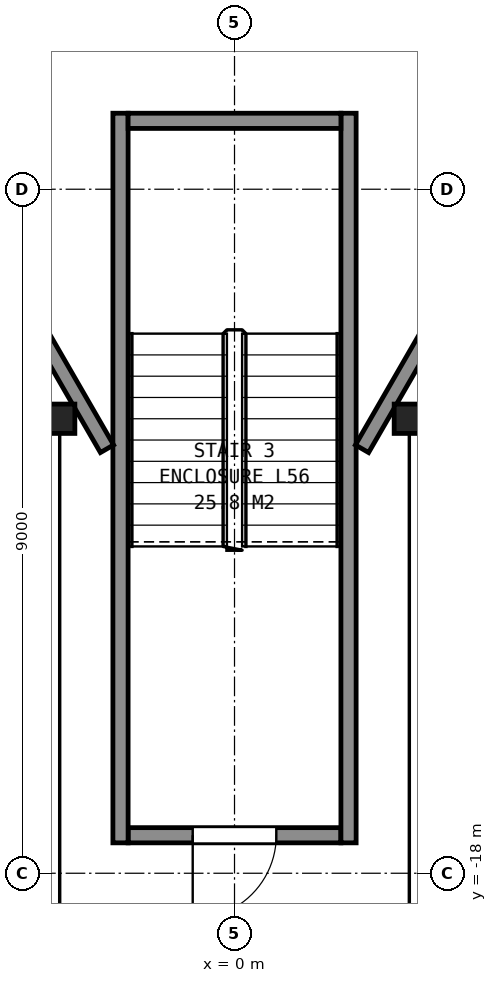
"""IFC4 building model, lengths in metres.
Left out: names, types, materials, properties, quantities, classifications, styles, units other than length and angle.
Written with IfcOpenShell. Run it as: python <this file> out.ifc"""

import sys

from ifc_helpers import new_model, si_unit, direction, frame, frame_2d, origin, origin_2d, place, context, subcontext, project, spatial, rectangle, i_section, extrude, element, fill, save


model = new_model("IFC4")
c1 = context("Model", 3, precision=1e-05, world=origin(), true_north=direction((0.0, 1.0)))
c2 = subcontext(c1, "Body", "Model", "MODEL_VIEW")
j1 = project(units=[si_unit("LENGTHUNIT", "METRE"), si_unit("PLANEANGLEUNIT", "RADIAN")], contexts=[c1])
p1 = place(None, origin())
s1 = spatial("IfcSite", under=j1, at=p1, CompositionType="ELEMENT")
p2 = place(p1, origin())
s2 = spatial("IfcBuilding", under=s1, at=p2, CompositionType="ELEMENT")
p3 = place(p2, frame((0.0, 0.0, 224.9)))
s3 = spatial("IfcBuildingStorey", under=s2, at=p3, CompositionType="ELEMENT", Elevation=224.9)
for number, where, z_axis, x_axis in (
    (1, (-2.3, -12.02, 0.0), (0.0, 0.0, 1.0), (1.0, 0.0, 0.0)),
    (2, (2.3, -12.02, 0.0), (0.0, 0.0, 1.0), (1.0, 0.0, 0.0)),
):
    element("IfcColumn", number, at=place(p3, frame(where, z_axis=z_axis, x_axis=x_axis)), inside=s3, PredefinedType="COLUMN", context=c2, shape_type="SweptSolid", body=[
        extrude(i_section(OverallWidth=0.399, OverallDepth=0.386, WebThickness=0.021, FlangeThickness=0.033, FilletRadius=0.015, at=origin_2d()), origin(), (0.0, 0.0, 1.0), 3.7),
    ])
p4 = place(p3, frame((-1.4, -17.5, 0.0), z_axis=(0.0, 0.0, 1.0), x_axis=(1.0, 0.0, 0.0)))
e3 = element("IfcWall", 3, at=p4, inside=s3, PredefinedType="PARTITIONING", context=c2, shape_type="SweptSolid", body=[
    extrude(rectangle(XDim=2.8, YDim=0.2, at=frame_2d((1.4, 0.0))), origin(), (0.0, 0.0, 1.0), 3.45),
])
p5 = place(p4, frame((0.85, 0.0, 0.0)))
e4 = element("IfcOpeningElement", 4, at=p5, cuts=e3, PredefinedType="OPENING", context=c2, shape_type="SweptSolid", body=[
    extrude(rectangle(XDim=1.1, YDim=2.1, at=frame_2d((0.55, 1.05))), frame((0.0, 0.11, 0.0), z_axis=(0.0, -1.0, 0.0), x_axis=(1.0, 0.0, 0.0)), (0.0, 0.0, 1.0), 0.22),
])
for number, where, z_axis, x_axis in (
    (5, (1.5, -8.0, 0.0), (0.0, 0.0, 1.0), (0.0, -1.0, 0.0)),
    (6, (-1.5, -8.0, 0.0), (0.0, 0.0, 1.0), (0.0, -1.0, 0.0)),
):
    element("IfcWall", number, at=place(p3, frame(where, z_axis=z_axis, x_axis=x_axis)), inside=s3, PredefinedType="PARTITIONING", context=c2, shape_type="SweptSolid", body=[
        extrude(rectangle(XDim=9.6, YDim=0.2, at=frame_2d((4.8, 0.0))), origin(), (0.0, 0.0, 1.0), 3.45),
    ])
p6 = place(p3, frame((-1.4, -8.1, 0.0), z_axis=(0.0, 0.0, 1.0), x_axis=(1.0, 0.0, 0.0)))
e7 = element("IfcWall", 7, at=p6, inside=s3, PredefinedType="PARTITIONING", context=c2, shape_type="SweptSolid", body=[
    extrude(rectangle(XDim=2.8, YDim=0.2, at=frame_2d((1.4, 0.0))), origin(), (0.0, 0.0, 1.0), 3.45),
])
p7 = place(p3, frame((-4.655, -7.257, 0.0), z_axis=(0.0, 0.0, 1.0), x_axis=(0.499966124405, -0.866044960985, 0.0)))
e8 = element("IfcWall", 8, at=p7, inside=s3, PredefinedType="PARTITIONING", context=c2, shape_type="SweptSolid", body=[
    extrude(rectangle(XDim=5.956, YDim=0.2, at=frame_2d((2.978, 0.0))), origin(), (0.0, 0.0, 1.0), 3.45),
])
p8 = place(p3, frame((1.677, -12.415, 0.0), z_axis=(0.0, 0.0, 1.0), x_axis=(0.500054337157, 0.865994029939, 0.0)))
e9 = element("IfcWall", 9, at=p8, inside=s3, PredefinedType="PARTITIONING", context=c2, shape_type="SweptSolid", body=[
    extrude(rectangle(XDim=6.177, YDim=0.2, at=frame_2d((3.088, 0.0))), origin(), (0.0, 0.0, 1.0), 3.45),
])
p9 = place(p8, frame((3.695, 0.0, 0.0)))
e10 = element("IfcOpeningElement", 10, at=p9, cuts=e9, PredefinedType="OPENING", context=c2, shape_type="SweptSolid", body=[
    extrude(rectangle(XDim=1.8, YDim=2.1, at=frame_2d((0.9, 1.05))), frame((0.0, 0.11, 0.0), z_axis=(0.0, -1.0, 0.0), x_axis=(1.0, 0.0, 0.0)), (0.0, 0.0, 1.0), 0.22),
])
p10 = place(p5, origin())
e11 = element("IfcDoor", 11, at=p10, inside=s3, OperationType="SINGLE_SWING_LEFT", PredefinedType="DOOR", context=c2, shape_type="SweptSolid", body=[
    extrude(rectangle(XDim=1.1, YDim=2.1, at=frame_2d((0.55, 1.05))), frame((0.0, 0.025, 0.0), z_axis=(0.0, -1.0, 0.0), x_axis=(1.0, 0.0, 0.0)), (0.0, 0.0, 1.0), 0.05),
])
fill(e4, e11)
save(model, sys.argv[1])
